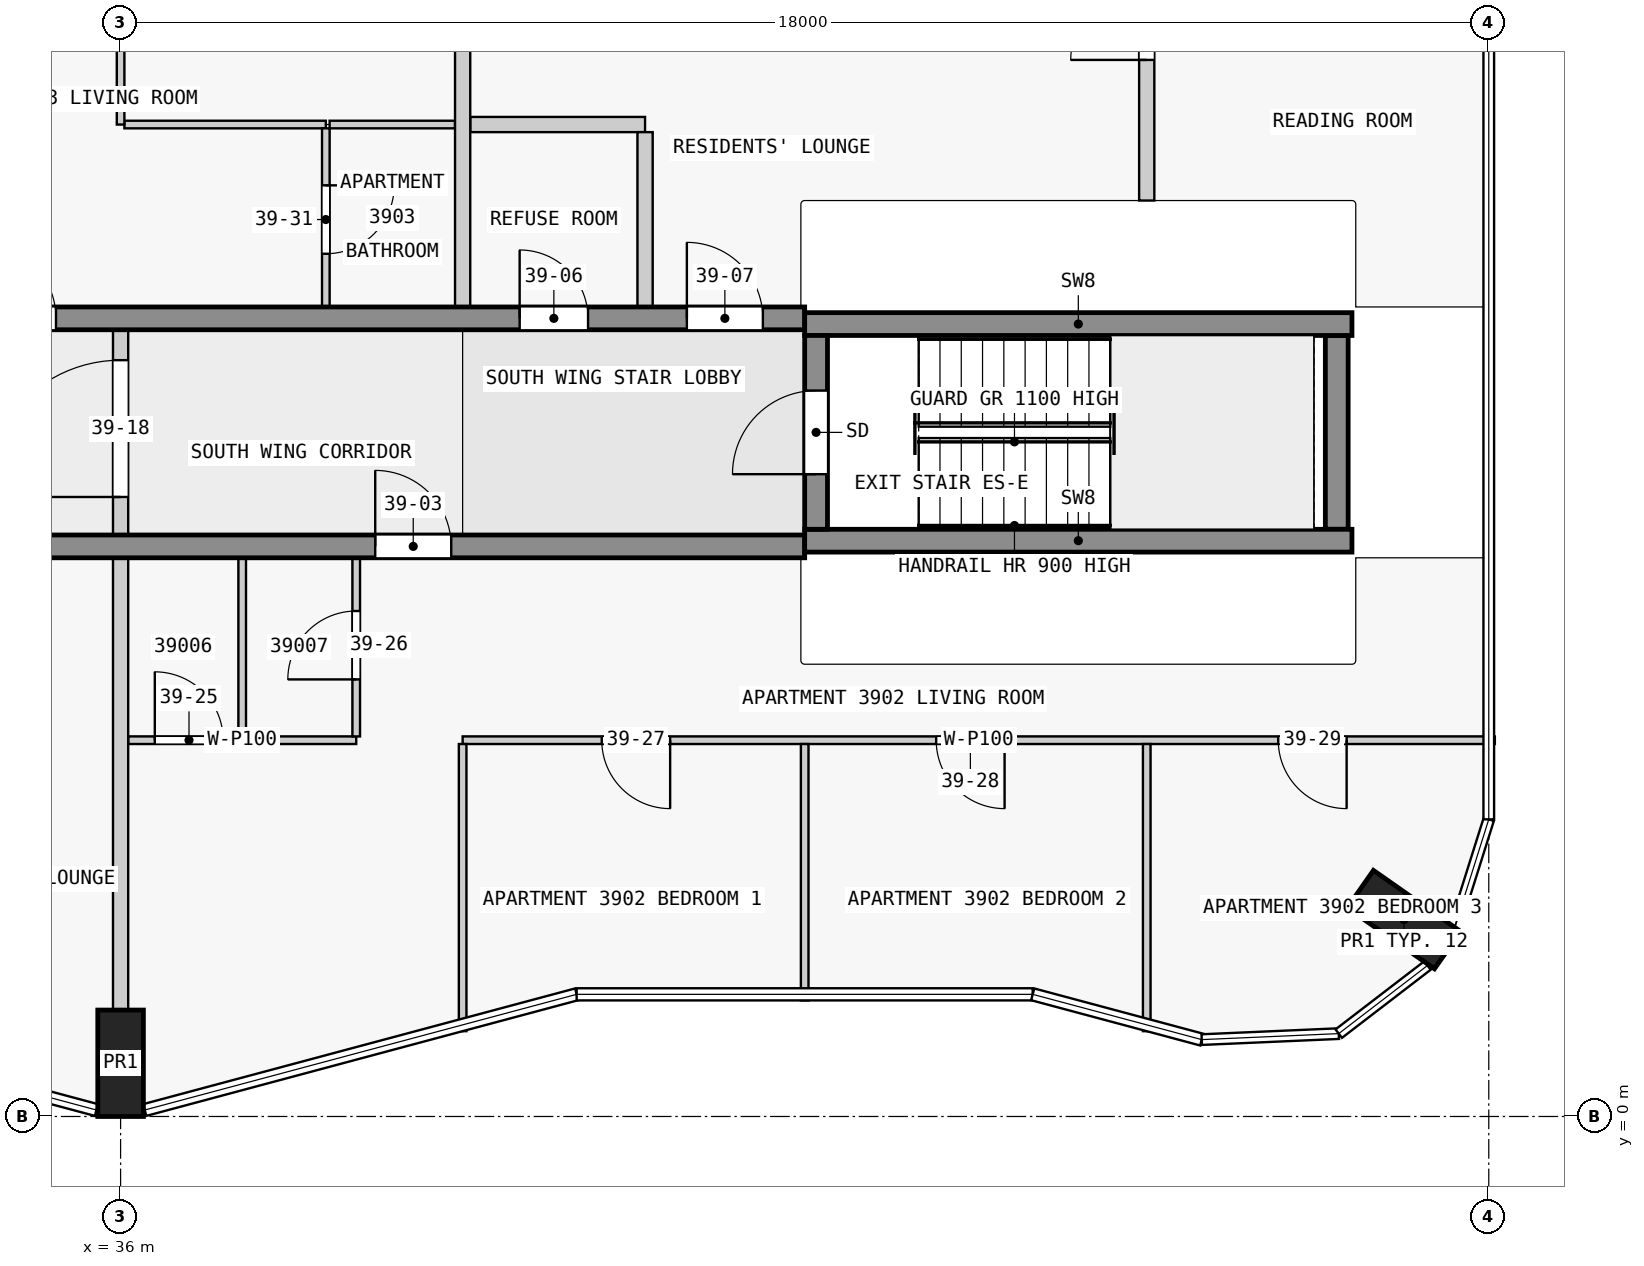
"""IFC4 building model, lengths in metres.
Left out: names, types, materials, properties, quantities, classifications, styles, units other than length and angle.
Written with IfcOpenShell. Run it as: python <this file> out.ifc"""

import sys

from ifc_helpers import new_model, si_unit, direction, frame, frame_2d, origin, origin_2d, place, context, subcontext, project, spatial, rectangle, extrude, element, fill, save


model = new_model("IFC4")
c1 = context("Model", 3, precision=1e-05, world=origin(), true_north=direction((0.0, 1.0)))
c2 = subcontext(c1, "Body", "Model", "MODEL_VIEW")
j1 = project(units=[si_unit("LENGTHUNIT", "METRE"), si_unit("PLANEANGLEUNIT", "RADIAN")], contexts=[c1])
p1 = place(None, origin())
s1 = spatial("IfcSite", under=j1, at=p1, CompositionType="ELEMENT")
p2 = place(p1, origin())
s2 = spatial("IfcBuilding", under=s1, at=p2, CompositionType="ELEMENT")
p3 = place(p2, frame((0.0, 0.0, 153.4)))
s3 = spatial("IfcBuildingStorey", under=s2, at=p3, CompositionType="ELEMENT", Elevation=153.4)
for number, where, z_axis, x_axis in (
    (1, (36.0, 0.7, 0.0), (0.0, 0.0, 1.0), (1.0, 0.0, 0.0)),
    (2, (52.884, 2.59, 0.0), (0.0, 0.0, 1.0), (0.574, 0.819, 0.0)),
):
    element("IfcColumn", number, at=place(p3, frame(where, z_axis=z_axis, x_axis=x_axis)), inside=s3, PredefinedType="COLUMN", context=c2, shape_type="SweptSolid", body=[
        extrude(rectangle(XDim=0.6, YDim=1.4, at=origin_2d()), origin(), (0.0, 0.0, 1.0), 3.5),
    ])
p4 = place(p3, frame((45.15, 7.725, 0.0), z_axis=(0.0, 0.0, 1.0), x_axis=(0.0, 1.0, 0.0)))
e3 = element("IfcWall", 3, at=p4, inside=s3, PredefinedType="SHEAR", context=c2, shape_type="SweptSolid", body=[
    extrude(rectangle(XDim=2.55, YDim=0.3, at=frame_2d((1.275, 0.0))), origin(), (0.0, 0.0, 1.0), 3.5),
])
p5 = place(p4, frame((0.725, 0.0, 0.0)))
e4 = element("IfcOpeningElement", 4, at=p5, cuts=e3, PredefinedType="OPENING", context=c2, shape_type="SweptSolid", body=[
    extrude(rectangle(XDim=1.1, YDim=2.1, at=frame_2d((0.55, 1.05))), frame((0.0, 0.16, 0.0), z_axis=(0.0, -1.0, 0.0), x_axis=(1.0, 0.0, 0.0)), (0.0, 0.0, 1.0), 0.32),
])
p6 = place(p3, frame((52.0, 7.725, 0.0), z_axis=(0.0, 0.0, 1.0), x_axis=(0.0, 1.0, 0.0)))
e5 = element("IfcWall", 5, at=p6, inside=s3, PredefinedType="SHEAR", context=c2, shape_type="SweptSolid", body=[
    extrude(rectangle(XDim=2.55, YDim=0.3, at=frame_2d((1.275, 0.0))), origin(), (0.0, 0.0, 1.0), 3.5),
])
for number, where, z_axis, x_axis in (
    (6, (45.0, 7.575, 0.0), (0.0, 0.0, 1.0), (1.0, 0.0, 0.0)),
    (7, (45.0, 10.425, 0.0), (0.0, 0.0, 1.0), (1.0, 0.0, 0.0)),
):
    element("IfcWall", number, at=place(p3, frame(where, z_axis=z_axis, x_axis=x_axis)), inside=s3, PredefinedType="SHEAR", context=c2, shape_type="SweptSolid", body=[
        extrude(rectangle(XDim=7.2, YDim=0.3, at=frame_2d((3.6, 0.0))), origin(), (0.0, 0.0, 1.0), 3.5),
    ])
p7 = place(p3, frame((22.5, 7.5, 0.0), z_axis=(0.0, 0.0, 1.0), x_axis=(1.0, 0.0, 0.0)))
e8 = element("IfcWall", 8, at=p7, inside=s3, PredefinedType="SHEAR", context=c2, shape_type="SweptSolid", body=[
    extrude(rectangle(XDim=22.5, YDim=0.3, at=frame_2d((11.25, 0.0))), origin(), (0.0, 0.0, 1.0), 3.25),
])
p8 = place(p7, frame((4.05, 0.0, 0.0)))
e9 = element("IfcOpeningElement", 9, at=p8, cuts=e8, PredefinedType="OPENING", context=c2, shape_type="SweptSolid", body=[
    extrude(rectangle(XDim=1.0, YDim=2.1, at=frame_2d((0.5, 1.05))), frame((0.0, 0.16, 0.0), z_axis=(0.0, -1.0, 0.0), x_axis=(1.0, 0.0, 0.0)), (0.0, 0.0, 1.0), 0.32),
])
p9 = place(p7, frame((10.35, 0.0, 0.0)))
e10 = element("IfcOpeningElement", 10, at=p9, cuts=e8, PredefinedType="OPENING", context=c2, shape_type="SweptSolid", body=[
    extrude(rectangle(XDim=1.8, YDim=2.1, at=frame_2d((0.9, 1.05))), frame((0.0, 0.16, 0.0), z_axis=(0.0, -1.0, 0.0), x_axis=(1.0, 0.0, 0.0)), (0.0, 0.0, 1.0), 0.32),
])
p10 = place(p7, frame((16.85, 0.0, 0.0)))
e11 = element("IfcOpeningElement", 11, at=p10, cuts=e8, PredefinedType="OPENING", context=c2, shape_type="SweptSolid", body=[
    extrude(rectangle(XDim=1.0, YDim=2.1, at=frame_2d((0.5, 1.05))), frame((0.0, 0.16, 0.0), z_axis=(0.0, -1.0, 0.0), x_axis=(1.0, 0.0, 0.0)), (0.0, 0.0, 1.0), 0.32),
])
p11 = place(p3, frame((22.5, 10.5, 0.0), z_axis=(0.0, 0.0, 1.0), x_axis=(1.0, 0.0, 0.0)))
e12 = element("IfcWall", 12, at=p11, inside=s3, PredefinedType="SHEAR", context=c2, shape_type="SweptSolid", body=[
    extrude(rectangle(XDim=22.5, YDim=0.3, at=frame_2d((11.25, 0.0))), origin(), (0.0, 0.0, 1.0), 3.25),
])
p12 = place(p11, frame((4.05, 0.0, 0.0)))
e13 = element("IfcOpeningElement", 13, at=p12, cuts=e12, PredefinedType="OPENING", context=c2, shape_type="SweptSolid", body=[
    extrude(rectangle(XDim=1.0, YDim=2.1, at=frame_2d((0.5, 1.05))), frame((0.0, 0.16, 0.0), z_axis=(0.0, -1.0, 0.0), x_axis=(1.0, 0.0, 0.0)), (0.0, 0.0, 1.0), 0.32),
])
p13 = place(p11, frame((11.65, 0.0, 0.0)))
e14 = element("IfcOpeningElement", 14, at=p13, cuts=e12, PredefinedType="OPENING", context=c2, shape_type="SweptSolid", body=[
    extrude(rectangle(XDim=1.0, YDim=2.1, at=frame_2d((0.5, 1.05))), frame((0.0, 0.16, 0.0), z_axis=(0.0, -1.0, 0.0), x_axis=(1.0, 0.0, 0.0)), (0.0, 0.0, 1.0), 0.32),
])
p14 = place(p11, frame((18.75, 0.0, 0.0)))
e15 = element("IfcOpeningElement", 15, at=p14, cuts=e12, PredefinedType="OPENING", context=c2, shape_type="SweptSolid", body=[
    extrude(rectangle(XDim=0.9, YDim=2.1, at=frame_2d((0.45, 1.05))), frame((0.0, 0.16, 0.0), z_axis=(0.0, -1.0, 0.0), x_axis=(1.0, 0.0, 0.0)), (0.0, 0.0, 1.0), 0.32),
])
p15 = place(p11, frame((20.95, 0.0, 0.0)))
e16 = element("IfcOpeningElement", 16, at=p15, cuts=e12, PredefinedType="OPENING", context=c2, shape_type="SweptSolid", body=[
    extrude(rectangle(XDim=1.0, YDim=2.1, at=frame_2d((0.5, 1.05))), frame((0.0, 0.16, 0.0), z_axis=(0.0, -1.0, 0.0), x_axis=(1.0, 0.0, 0.0)), (0.0, 0.0, 1.0), 0.32),
])
p16 = place(p3, frame((54.08, 4.95, 0.0), z_axis=(0.0, 0.0, 1.0), x_axis=(-1.0, 0.0, 0.0)))
e17 = element("IfcWall", 17, at=p16, inside=s3, PredefinedType="PARTITIONING", context=c2, shape_type="SweptSolid", body=[
    extrude(rectangle(XDim=13.58, YDim=0.1, at=frame_2d((6.79, 0.0))), origin(), (0.0, 0.0, 1.0), 3.25),
])
p17 = place(p16, frame((10.85, 0.0, 0.0)))
e18 = element("IfcOpeningElement", 18, at=p17, cuts=e17, PredefinedType="OPENING", context=c2, shape_type="SweptSolid", body=[
    extrude(rectangle(XDim=0.9, YDim=2.1, at=frame_2d((0.45, 1.05))), frame((0.0, 0.06, 0.0), z_axis=(0.0, -1.0, 0.0), x_axis=(1.0, 0.0, 0.0)), (0.0, 0.0, 1.0), 0.12),
])
p18 = place(p16, frame((6.45, 0.0, 0.0)))
e19 = element("IfcOpeningElement", 19, at=p18, cuts=e17, PredefinedType="OPENING", context=c2, shape_type="SweptSolid", body=[
    extrude(rectangle(XDim=0.9, YDim=2.1, at=frame_2d((0.45, 1.05))), frame((0.0, 0.06, 0.0), z_axis=(0.0, -1.0, 0.0), x_axis=(1.0, 0.0, 0.0)), (0.0, 0.0, 1.0), 0.12),
])
p19 = place(p16, frame((1.95, 0.0, 0.0)))
e20 = element("IfcOpeningElement", 20, at=p19, cuts=e17, PredefinedType="OPENING", context=c2, shape_type="SweptSolid", body=[
    extrude(rectangle(XDim=0.9, YDim=2.1, at=frame_2d((0.45, 1.05))), frame((0.0, 0.06, 0.0), z_axis=(0.0, -1.0, 0.0), x_axis=(1.0, 0.0, 0.0)), (0.0, 0.0, 1.0), 0.12),
])
p20 = place(p3, frame((36.1, 4.95, 0.0), z_axis=(0.0, 0.0, 1.0), x_axis=(1.0, 0.0, 0.0)))
e21 = element("IfcWall", 21, at=p20, inside=s3, PredefinedType="PARTITIONING", context=c2, shape_type="SweptSolid", body=[
    extrude(rectangle(XDim=3.0, YDim=0.1, at=frame_2d((1.5, 0.0))), origin(), (0.0, 0.0, 1.0), 3.25),
])
p21 = place(p20, frame((0.35, 0.0, 0.0)))
e22 = element("IfcOpeningElement", 22, at=p21, cuts=e21, PredefinedType="OPENING", context=c2, shape_type="SweptSolid", body=[
    extrude(rectangle(XDim=0.9, YDim=2.1, at=frame_2d((0.45, 1.05))), frame((0.0, 0.06, 0.0), z_axis=(0.0, -1.0, 0.0), x_axis=(1.0, 0.0, 0.0)), (0.0, 0.0, 1.0), 0.12),
])
p22 = place(p3, frame((40.4, 13.05, 0.0), z_axis=(0.0, 0.0, 1.0), x_axis=(-1.0, 0.0, 0.0)))
e23 = element("IfcWall", 23, at=p22, inside=s3, PredefinedType="PARTITIONING", context=c2, shape_type="SweptSolid", body=[
    extrude(rectangle(XDim=1.65, YDim=0.1, at=frame_2d((0.825, 0.0))), origin(), (0.0, 0.0, 1.0), 3.25),
])
p23 = place(p3, frame((36.05, 13.05, 0.0), z_axis=(0.0, 0.0, 1.0), x_axis=(1.0, 0.0, 0.0)))
e24 = element("IfcWall", 24, at=p23, inside=s3, PredefinedType="PARTITIONING", context=c2, shape_type="SweptSolid", body=[
    extrude(rectangle(XDim=2.65, YDim=0.1, at=frame_2d((1.325, 0.0))), origin(), (0.0, 0.0, 1.0), 3.25),
])
p24 = place(p3, frame((42.9, 13.05, 0.0), z_axis=(0.0, 0.0, 1.0), x_axis=(-1.0, 0.0, 0.0)))
e25 = element("IfcWall", 25, at=p24, inside=s3, PredefinedType="PARTITIONING", context=c2, shape_type="SweptSolid", body=[
    extrude(rectangle(XDim=2.3, YDim=0.2, at=frame_2d((1.15, 0.0))), origin(), (0.0, 0.0, 1.0), 3.25),
])
p25 = place(p3, frame((36.0, 16.6, 0.0), z_axis=(0.0, 0.0, 1.0), x_axis=(0.0, -1.0, 0.0)))
e26 = element("IfcWall", 26, at=p25, inside=s3, PredefinedType="PARTITIONING", context=c2, shape_type="SweptSolid", body=[
    extrude(rectangle(XDim=3.55, YDim=0.1, at=frame_2d((1.775, 0.0))), origin(), (0.0, 0.0, 1.0), 3.25),
])
p26 = place(p25, frame((1.35, 0.0, 0.0)))
e27 = element("IfcOpeningElement", 27, at=p26, cuts=e26, PredefinedType="OPENING", context=c2, shape_type="SweptSolid", body=[
    extrude(rectangle(XDim=0.9, YDim=2.1, at=frame_2d((0.45, 1.05))), frame((0.0, 0.06, 0.0), z_axis=(0.0, -1.0, 0.0), x_axis=(1.0, 0.0, 0.0)), (0.0, 0.0, 1.0), 0.12),
])
p27 = place(p3, frame((36.0, 1.4, 0.0), z_axis=(0.0, 0.0, 1.0), x_axis=(0.0, 1.0, 0.0)))
e28 = element("IfcWall", 28, at=p27, inside=s3, PredefinedType="PARTITIONING", context=c2, shape_type="SweptSolid", body=[
    extrude(rectangle(XDim=5.95, YDim=0.2, at=frame_2d((2.975, 0.0))), origin(), (0.0, 0.0, 1.0), 3.25),
])
p28 = place(p3, frame((37.6, 5.0, 0.0), z_axis=(0.0, 0.0, 1.0), x_axis=(0.0, 1.0, 0.0)))
e29 = element("IfcWall", 29, at=p28, inside=s3, PredefinedType="PARTITIONING", context=c2, shape_type="SweptSolid", body=[
    extrude(rectangle(XDim=2.35, YDim=0.1, at=frame_2d((1.175, 0.0))), origin(), (0.0, 0.0, 1.0), 3.25),
])
p29 = place(p3, frame((38.7, 13.0, 0.0), z_axis=(0.0, 0.0, 1.0), x_axis=(0.0, -1.0, 0.0)))
e30 = element("IfcWall", 30, at=p29, inside=s3, PredefinedType="PARTITIONING", context=c2, shape_type="SweptSolid", body=[
    extrude(rectangle(XDim=2.35, YDim=0.1, at=frame_2d((1.175, 0.0))), origin(), (0.0, 0.0, 1.0), 3.25),
])
p30 = place(p29, frame((0.75, 0.0, 0.0)))
e31 = element("IfcOpeningElement", 31, at=p30, cuts=e30, PredefinedType="OPENING", context=c2, shape_type="SweptSolid", body=[
    extrude(rectangle(XDim=0.9, YDim=2.1, at=frame_2d((0.45, 1.05))), frame((0.0, 0.06, 0.0), z_axis=(0.0, -1.0, 0.0), x_axis=(1.0, 0.0, 0.0)), (0.0, 0.0, 1.0), 0.12),
])
p31 = place(p3, frame((39.1, 5.0, 0.0), z_axis=(0.0, 0.0, 1.0), x_axis=(0.0, 1.0, 0.0)))
e32 = element("IfcWall", 32, at=p31, inside=s3, PredefinedType="PARTITIONING", context=c2, shape_type="SweptSolid", body=[
    extrude(rectangle(XDim=2.35, YDim=0.1, at=frame_2d((1.175, 0.0))), origin(), (0.0, 0.0, 1.0), 3.25),
])
p32 = place(p31, frame((0.75, 0.0, 0.0)))
e33 = element("IfcOpeningElement", 33, at=p32, cuts=e32, PredefinedType="OPENING", context=c2, shape_type="SweptSolid", body=[
    extrude(rectangle(XDim=0.9, YDim=2.1, at=frame_2d((0.45, 1.05))), frame((0.0, 0.06, 0.0), z_axis=(0.0, -1.0, 0.0), x_axis=(1.0, 0.0, 0.0)), (0.0, 0.0, 1.0), 0.12),
])
p33 = place(p3, frame((40.5, 4.9, 0.0), z_axis=(0.0, 0.0, 1.0), x_axis=(0.0, -1.0, 0.0)))
e34 = element("IfcWall", 34, at=p33, inside=s3, PredefinedType="PARTITIONING", context=c2, shape_type="SweptSolid", body=[
    extrude(rectangle(XDim=3.778, YDim=0.1, at=frame_2d((1.889, 0.0))), origin(), (0.0, 0.0, 1.0), 3.25),
])
p34 = place(p3, frame((40.5, 10.65, 0.0), z_axis=(0.0, 0.0, 1.0), x_axis=(0.0, 1.0, 0.0)))
e35 = element("IfcWall", 35, at=p34, inside=s3, PredefinedType="PARTITIONING", context=c2, shape_type="SweptSolid", body=[
    extrude(rectangle(XDim=6.228, YDim=0.2, at=frame_2d((3.114, 0.0))), origin(), (0.0, 0.0, 1.0), 3.25),
])
p35 = place(p3, frame((42.9, 10.65, 0.0), z_axis=(0.0, 0.0, 1.0), x_axis=(0.0, 1.0, 0.0)))
e36 = element("IfcWall", 36, at=p35, inside=s3, PredefinedType="PARTITIONING", context=c2, shape_type="SweptSolid", body=[
    extrude(rectangle(XDim=2.3, YDim=0.2, at=frame_2d((1.15, 0.0))), origin(), (0.0, 0.0, 1.0), 3.25),
])
p36 = place(p3, frame((45.0, 1.527, 0.0), z_axis=(0.0, 0.0, 1.0), x_axis=(0.0, 1.0, 0.0)))
e37 = element("IfcWall", 37, at=p36, inside=s3, PredefinedType="PARTITIONING", context=c2, shape_type="SweptSolid", body=[
    extrude(rectangle(XDim=3.373, YDim=0.1, at=frame_2d((1.687, 0.0))), origin(), (0.0, 0.0, 1.0), 3.25),
])
p37 = place(p3, frame((49.5, 1.122, 0.0), z_axis=(0.0, 0.0, 1.0), x_axis=(0.0, 1.0, 0.0)))
e38 = element("IfcWall", 38, at=p37, inside=s3, PredefinedType="PARTITIONING", context=c2, shape_type="SweptSolid", body=[
    extrude(rectangle(XDim=3.778, YDim=0.1, at=frame_2d((1.889, 0.0))), origin(), (0.0, 0.0, 1.0), 3.25),
])
p38 = place(p3, frame((49.5, 12.05, 0.0), z_axis=(0.0, 0.0, 1.0), x_axis=(0.0, 1.0, 0.0)))
e39 = element("IfcWall", 39, at=p38, inside=s3, PredefinedType="PARTITIONING", context=c2, shape_type="SweptSolid", body=[
    extrude(rectangle(XDim=4.828, YDim=0.2, at=frame_2d((2.414, 0.0))), origin(), (0.0, 0.0, 1.0), 3.25),
])
p39 = place(p38, frame((1.85, 0.0, 0.0)))
e40 = element("IfcOpeningElement", 40, at=p39, cuts=e39, PredefinedType="OPENING", context=c2, shape_type="SweptSolid", body=[
    extrude(rectangle(XDim=1.0, YDim=2.1, at=frame_2d((0.5, 1.05))), frame((0.0, 0.11, 0.0), z_axis=(0.0, -1.0, 0.0), x_axis=(1.0, 0.0, 0.0)), (0.0, 0.0, 1.0), 0.22),
])
p40 = place(p3, frame((36.0, 7.45, 0.0), z_axis=(0.0, 0.0, 1.0), x_axis=(0.0, 1.0, 0.0)))
e41 = element("IfcWall", 41, at=p40, inside=s3, PredefinedType="PARTITIONING", context=c2, shape_type="SweptSolid", body=[
    extrude(rectangle(XDim=3.2, YDim=0.2, at=frame_2d((1.6, 0.0))), origin(), (0.0, 0.0, 1.0), 3.25),
])
p41 = place(p40, frame((0.7, 0.0, 0.0)))
e42 = element("IfcOpeningElement", 42, at=p41, cuts=e41, PredefinedType="OPENING", context=c2, shape_type="SweptSolid", body=[
    extrude(rectangle(XDim=1.8, YDim=2.1, at=frame_2d((0.9, 1.05))), frame((0.0, 0.11, 0.0), z_axis=(0.0, -1.0, 0.0), x_axis=(1.0, 0.0, 0.0)), (0.0, 0.0, 1.0), 0.22),
])
p42 = place(p5, origin())
e43 = element("IfcDoor", 43, at=p42, inside=s3, OperationType="SINGLE_SWING_LEFT", PredefinedType="DOOR", context=c2, shape_type="SweptSolid", body=[
    extrude(rectangle(XDim=1.1, YDim=2.1, at=frame_2d((0.55, 1.05))), frame((0.0, 0.025, 0.0), z_axis=(0.0, -1.0, 0.0), x_axis=(1.0, 0.0, 0.0)), (0.0, 0.0, 1.0), 0.05),
])
fill(e4, e43)
p43 = place(p10, origin())
e44 = element("IfcDoor", 44, at=p43, inside=s3, OperationType="SINGLE_SWING_RIGHT", PredefinedType="DOOR", context=c2, shape_type="SweptSolid", body=[
    extrude(rectangle(XDim=1.0, YDim=2.1, at=frame_2d((0.5, 1.05))), frame((0.0, 0.025, 0.0), z_axis=(0.0, -1.0, 0.0), x_axis=(1.0, 0.0, 0.0)), (0.0, 0.0, 1.0), 0.05),
])
fill(e11, e44)
p44 = place(p13, origin())
e45 = element("IfcDoor", 45, at=p44, inside=s3, OperationType="SINGLE_SWING_RIGHT", PredefinedType="DOOR", context=c2, shape_type="SweptSolid", body=[
    extrude(rectangle(XDim=1.0, YDim=2.1, at=frame_2d((0.5, 1.05))), frame((0.0, 0.025, 0.0), z_axis=(0.0, -1.0, 0.0), x_axis=(1.0, 0.0, 0.0)), (0.0, 0.0, 1.0), 0.05),
])
fill(e14, e45)
p45 = place(p14, origin())
e46 = element("IfcDoor", 46, at=p45, inside=s3, OperationType="SINGLE_SWING_RIGHT", PredefinedType="DOOR", context=c2, shape_type="SweptSolid", body=[
    extrude(rectangle(XDim=0.9, YDim=2.1, at=frame_2d((0.45, 1.05))), frame((0.0, 0.025, 0.0), z_axis=(0.0, -1.0, 0.0), x_axis=(1.0, 0.0, 0.0)), (0.0, 0.0, 1.0), 0.05),
])
fill(e15, e46)
p46 = place(p15, origin())
e47 = element("IfcDoor", 47, at=p46, inside=s3, OperationType="SINGLE_SWING_RIGHT", PredefinedType="DOOR", context=c2, shape_type="SweptSolid", body=[
    extrude(rectangle(XDim=1.0, YDim=2.1, at=frame_2d((0.5, 1.05))), frame((0.0, 0.025, 0.0), z_axis=(0.0, -1.0, 0.0), x_axis=(1.0, 0.0, 0.0)), (0.0, 0.0, 1.0), 0.05),
])
fill(e16, e47)
p47 = place(p41, origin())
e48 = element("IfcDoor", 48, at=p47, inside=s3, OperationType="SINGLE_SWING_LEFT", PredefinedType="DOOR", context=c2, shape_type="SweptSolid", body=[
    extrude(rectangle(XDim=1.8, YDim=2.1, at=frame_2d((0.9, 1.05))), frame((0.0, 0.025, 0.0), z_axis=(0.0, -1.0, 0.0), x_axis=(1.0, 0.0, 0.0)), (0.0, 0.0, 1.0), 0.05),
])
fill(e42, e48)
p48 = place(p39, origin())
e49 = element("IfcDoor", 49, at=p48, inside=s3, OperationType="SINGLE_SWING_LEFT", PredefinedType="DOOR", context=c2, shape_type="SweptSolid", body=[
    extrude(rectangle(XDim=1.0, YDim=2.1, at=frame_2d((0.5, 1.05))), frame((0.0, 0.025, 0.0), z_axis=(0.0, -1.0, 0.0), x_axis=(1.0, 0.0, 0.0)), (0.0, 0.0, 1.0), 0.05),
])
fill(e40, e49)
p49 = place(p21, origin())
e50 = element("IfcDoor", 50, at=p49, inside=s3, OperationType="SINGLE_SWING_LEFT", PredefinedType="DOOR", context=c2, shape_type="SweptSolid", body=[
    extrude(rectangle(XDim=0.9, YDim=2.1, at=frame_2d((0.45, 1.05))), frame((0.0, 0.025, 0.0), z_axis=(0.0, -1.0, 0.0), x_axis=(1.0, 0.0, 0.0)), (0.0, 0.0, 1.0), 0.05),
])
fill(e22, e50)
p50 = place(p32, origin())
e51 = element("IfcDoor", 51, at=p50, inside=s3, OperationType="SINGLE_SWING_RIGHT", PredefinedType="DOOR", context=c2, shape_type="SweptSolid", body=[
    extrude(rectangle(XDim=0.9, YDim=2.1, at=frame_2d((0.45, 1.05))), frame((0.0, 0.025, 0.0), z_axis=(0.0, -1.0, 0.0), x_axis=(1.0, 0.0, 0.0)), (0.0, 0.0, 1.0), 0.05),
])
fill(e33, e51)
p51 = place(p17, origin())
e52 = element("IfcDoor", 52, at=p51, inside=s3, OperationType="SINGLE_SWING_RIGHT", PredefinedType="DOOR", context=c2, shape_type="SweptSolid", body=[
    extrude(rectangle(XDim=0.9, YDim=2.1, at=frame_2d((0.45, 1.05))), frame((0.0, 0.025, 0.0), z_axis=(0.0, -1.0, 0.0), x_axis=(1.0, 0.0, 0.0)), (0.0, 0.0, 1.0), 0.05),
])
fill(e18, e52)
p52 = place(p18, origin())
e53 = element("IfcDoor", 53, at=p52, inside=s3, OperationType="SINGLE_SWING_RIGHT", PredefinedType="DOOR", context=c2, shape_type="SweptSolid", body=[
    extrude(rectangle(XDim=0.9, YDim=2.1, at=frame_2d((0.45, 1.05))), frame((0.0, 0.025, 0.0), z_axis=(0.0, -1.0, 0.0), x_axis=(1.0, 0.0, 0.0)), (0.0, 0.0, 1.0), 0.05),
])
fill(e19, e53)
p53 = place(p19, origin())
e54 = element("IfcDoor", 54, at=p53, inside=s3, OperationType="SINGLE_SWING_LEFT", PredefinedType="DOOR", context=c2, shape_type="SweptSolid", body=[
    extrude(rectangle(XDim=0.9, YDim=2.1, at=frame_2d((0.45, 1.05))), frame((0.0, 0.025, 0.0), z_axis=(0.0, -1.0, 0.0), x_axis=(1.0, 0.0, 0.0)), (0.0, 0.0, 1.0), 0.05),
])
fill(e20, e54)
p54 = place(p30, origin())
e55 = element("IfcDoor", 55, at=p54, inside=s3, OperationType="SINGLE_SWING_RIGHT", PredefinedType="DOOR", context=c2, shape_type="SweptSolid", body=[
    extrude(rectangle(XDim=0.9, YDim=2.1, at=frame_2d((0.45, 1.05))), frame((0.0, 0.025, 0.0), z_axis=(0.0, -1.0, 0.0), x_axis=(1.0, 0.0, 0.0)), (0.0, 0.0, 1.0), 0.05),
])
fill(e31, e55)
save(model, sys.argv[1])
